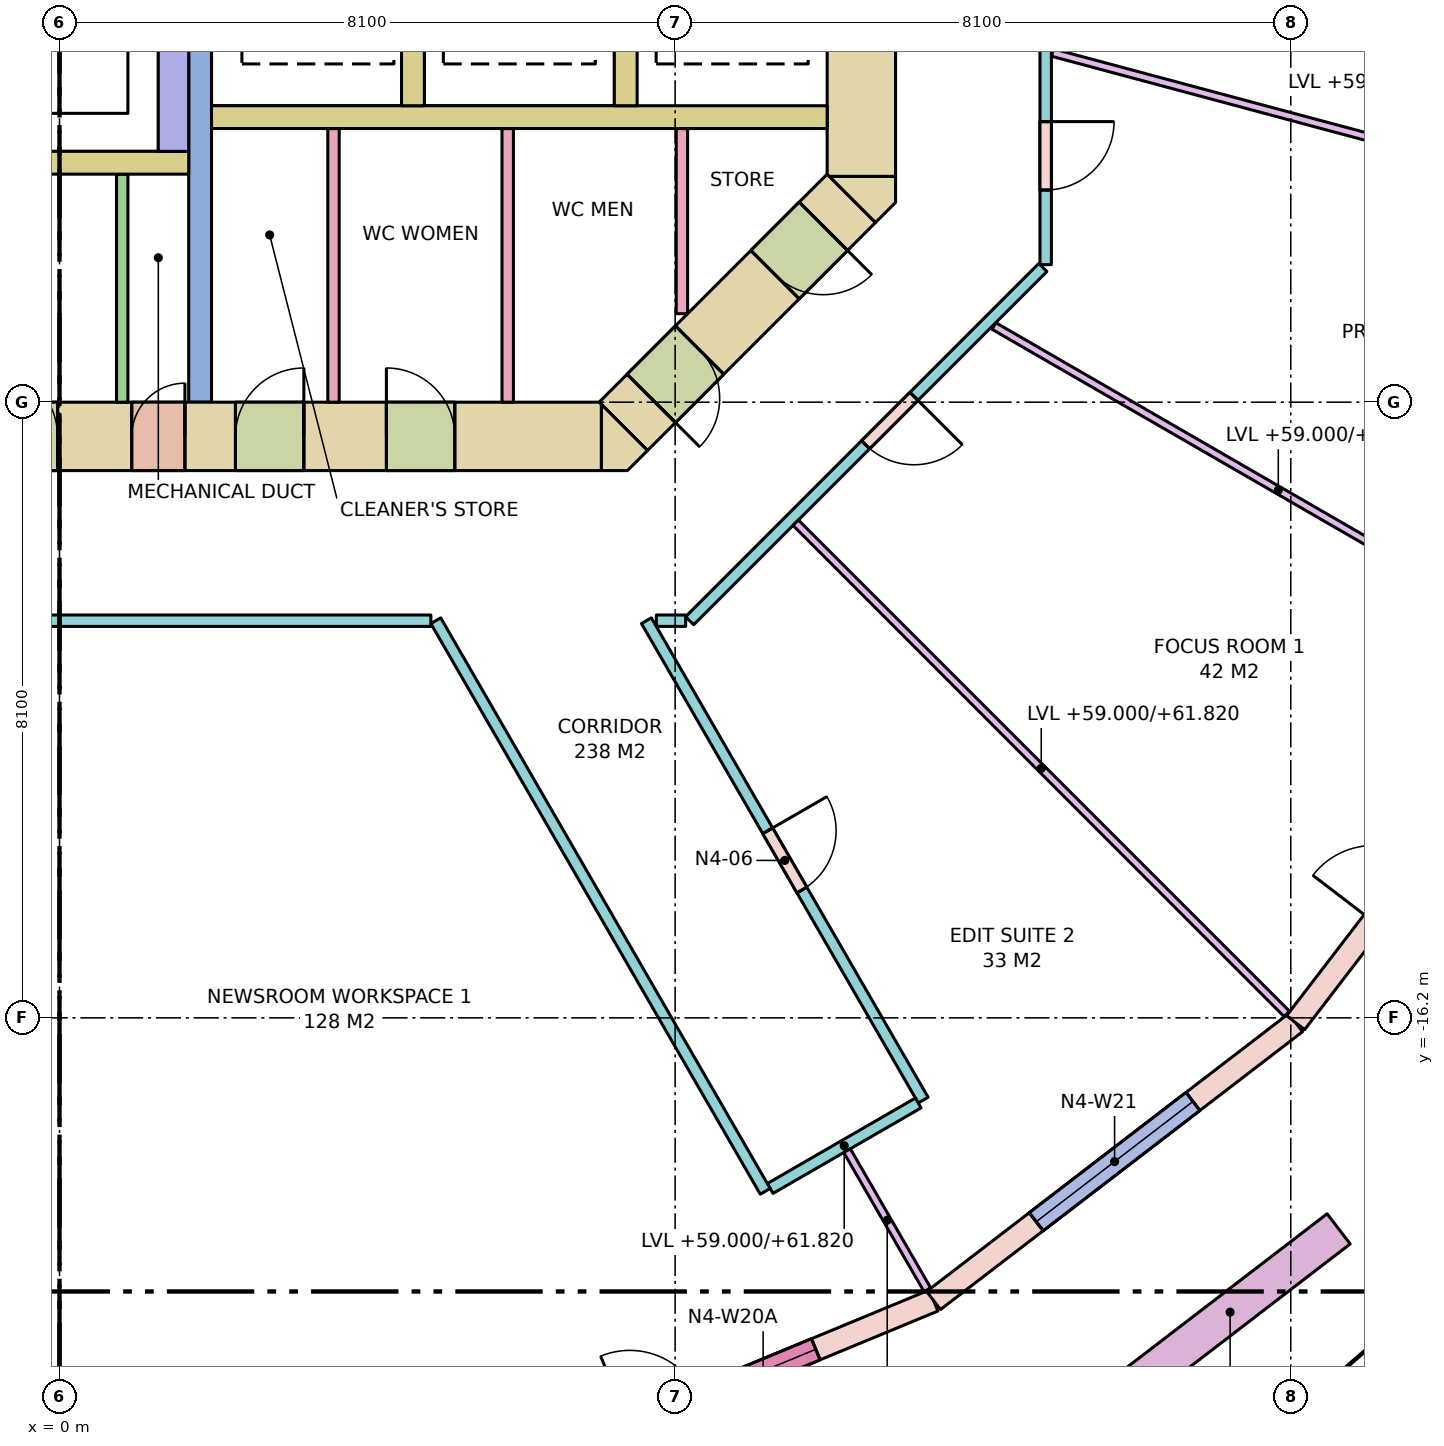
"""IFC4 building model, lengths in metres.
Left out: names, types, materials, properties, quantities, classifications, styles, units other than length and angle.
Written with IfcOpenShell. Run it as: python <this file> out.ifc"""

import sys

from ifc_helpers import new_model, si_unit, direction, frame, frame_2d, origin, place, context, subcontext, project, spatial, polyline, rectangle, outline, extrude, element, fill, save


model = new_model("IFC4")
c1 = context("Model", 3, precision=1e-05, world=origin(), true_north=direction((0.0, 1.0)))
c2 = subcontext(c1, "Body", "Model", "MODEL_VIEW")
j1 = project(units=[si_unit("LENGTHUNIT", "METRE"), si_unit("PLANEANGLEUNIT", "RADIAN")], contexts=[c1])
p1 = place(None, origin())
s1 = spatial("IfcSite", under=j1, at=p1, CompositionType="ELEMENT")
p2 = place(p1, origin())
s2 = spatial("IfcBuilding", under=s1, at=p2, CompositionType="ELEMENT")
p3 = place(p2, frame((0.0, 0.0, 59.0)))
s3 = spatial("IfcBuildingStorey", under=s2, at=p3, CompositionType="ELEMENT", Elevation=59.0)
p4 = place(p3, frame((-7.13, -8.55, -0.28), z_axis=(0.0, 0.0, 1.0), x_axis=(1.0, 0.0, 0.0)))
e1 = element("IfcWall", 1, at=p4, inside=s3, PredefinedType="SHEAR", context=c2, shape_type="SweptSolid", body=[
    extrude(rectangle(XDim=14.26, YDim=0.9, at=frame_2d((7.13, 0.0))), origin(), (0.0, 0.0, 1.0), 4.0),
])
p5 = place(p4, frame((8.08, 0.0, 0.28)))
e2 = element("IfcOpeningElement", 2, at=p5, cuts=e1, PredefinedType="OPENING", context=c2, shape_type="SweptSolid", body=[
    extrude(rectangle(XDim=0.7, YDim=2.1, at=frame_2d((0.35, 1.05))), frame((0.0, 0.46, 0.0), z_axis=(0.0, -1.0, 0.0), x_axis=(1.0, 0.0, 0.0)), (0.0, 0.0, 1.0), 0.92),
])
p6 = place(p4, frame((6.205, 0.0, 0.28)))
e3 = element("IfcOpeningElement", 3, at=p6, cuts=e1, PredefinedType="OPENING", context=c2, shape_type="SweptSolid", body=[
    extrude(rectangle(XDim=0.9, YDim=2.1, at=frame_2d((0.45, 1.05))), frame((0.0, 0.46, 0.0), z_axis=(0.0, -1.0, 0.0), x_axis=(1.0, 0.0, 0.0)), (0.0, 0.0, 1.0), 0.92),
])
p7 = place(p4, frame((9.445, 0.0, 0.28)))
e4 = element("IfcOpeningElement", 4, at=p7, cuts=e1, PredefinedType="OPENING", context=c2, shape_type="SweptSolid", body=[
    extrude(rectangle(XDim=0.9, YDim=2.1, at=frame_2d((0.45, 1.05))), frame((0.0, 0.46, 0.0), z_axis=(0.0, -1.0, 0.0), x_axis=(1.0, 0.0, 0.0)), (0.0, 0.0, 1.0), 0.92),
])
p8 = place(p4, frame((11.431, 0.0, 0.28)))
e5 = element("IfcOpeningElement", 5, at=p8, cuts=e1, PredefinedType="OPENING", context=c2, shape_type="SweptSolid", body=[
    extrude(rectangle(XDim=0.9, YDim=2.1, at=frame_2d((0.45, 1.05))), frame((0.0, 0.46, 0.0), z_axis=(0.0, -1.0, 0.0), x_axis=(1.0, 0.0, 0.0)), (0.0, 0.0, 1.0), 0.92),
])
p9 = place(p3, frame((10.55, -5.13, -0.28), z_axis=(0.0, 0.0, 1.0), x_axis=(0.0, 1.0, 0.0)))
e6 = element("IfcWall", 6, at=p9, inside=s3, PredefinedType="SHEAR", context=c2, shape_type="SweptSolid", body=[
    extrude(rectangle(XDim=10.26, YDim=0.9, at=frame_2d((5.13, 0.0))), origin(), (0.0, 0.0, 1.0), 4.0),
])
p10 = place(p9, frame((4.13, 0.0, 0.28)))
e7 = element("IfcOpeningElement", 7, at=p10, cuts=e6, PredefinedType="OPENING", context=c2, shape_type="SweptSolid", body=[
    extrude(rectangle(XDim=2.0, YDim=2.1, at=frame_2d((1.0, 1.05))), frame((0.0, 0.46, 0.0), z_axis=(0.0, -1.0, 0.0), x_axis=(1.0, 0.0, 0.0)), (0.0, 0.0, 1.0), 0.92),
])
p11 = place(p3, frame((10.418, -5.418, -0.28), z_axis=(0.0, 0.0, 1.0), x_axis=(-0.707106781187, -0.707106781187, 0.0)))
e8 = element("IfcWall", 8, at=p11, inside=s3, PredefinedType="SHEAR", context=c2, shape_type="SweptSolid", body=[
    extrude(rectangle(XDim=4.243, YDim=0.9, at=frame_2d((2.121, 0.0))), origin(), (0.0, 0.0, 1.0), 4.0),
])
p12 = place(p11, frame((2.823, 0.0, 0.28)))
e9 = element("IfcOpeningElement", 9, at=p12, cuts=e8, PredefinedType="OPENING", context=c2, shape_type="SweptSolid", body=[
    extrude(rectangle(XDim=0.9, YDim=2.1, at=frame_2d((0.45, 1.05))), frame((0.0, 0.46, 0.0), z_axis=(0.0, -1.0, 0.0), x_axis=(1.0, 0.0, 0.0)), (0.0, 0.0, 1.0), 0.92),
])
p13 = place(p11, frame((0.52, 0.0, 0.28)))
e10 = element("IfcOpeningElement", 10, at=p13, cuts=e8, PredefinedType="OPENING", context=c2, shape_type="SweptSolid", body=[
    extrude(rectangle(XDim=0.9, YDim=2.1, at=frame_2d((0.45, 1.05))), frame((0.0, 0.46, 0.0), z_axis=(0.0, -1.0, 0.0), x_axis=(1.0, 0.0, 0.0)), (0.0, 0.0, 1.0), 0.92),
])
p14 = place(p3, frame((0.0, 0.0, -0.28)))
e11 = element("IfcWall", 11, at=p14, inside=s3, PredefinedType="SHEAR", context=c2, shape_type="SweptSolid", body=[
    extrude(outline(polyline([(7.473, -9.0), (7.13, -9.0), (7.13, -8.13), (7.736, -8.736), (7.473, -9.0)])), origin(), (0.0, 0.0, 1.0), 4.0),
])
p15 = place(p3, frame((0.0, 0.0, -0.28)))
e12 = element("IfcWall", 12, at=p15, inside=s3, PredefinedType="SHEAR", context=c2, shape_type="SweptSolid", body=[
    extrude(outline(polyline([(11.0, -5.473), (10.736, -5.736), (10.13, -5.13), (11.0, -5.13), (11.0, -5.473)])), origin(), (0.0, 0.0, 1.0), 4.0),
])
p16 = place(p3, frame((2.0, -4.35, 0.0), z_axis=(0.0, 0.0, 1.0), x_axis=(1.0, 0.0, 0.0)))
e13 = element("IfcWall", 13, at=p16, inside=s3, PredefinedType="SOLIDWALL", context=c2, shape_type="SweptSolid", body=[
    extrude(rectangle(XDim=8.1, YDim=0.3, at=frame_2d((4.05, 0.0))), origin(), (0.0, 0.0, 1.0), 3.72),
])
for number, where, z_axis, x_axis in (
    (14, (4.65, -4.2, 0.0), (0.0, 0.0, 1.0), (0.0, 1.0, 0.0)),
    (15, (7.45, -4.2, 0.0), (0.0, 0.0, 1.0), (0.0, 1.0, 0.0)),
):
    element("IfcWall", number, at=place(p3, frame(where, z_axis=z_axis, x_axis=x_axis)), inside=s3, PredefinedType="SOLIDWALL", context=c2, shape_type="SweptSolid", body=[
        extrude(rectangle(XDim=2.4, YDim=0.3, at=frame_2d((1.2, 0.0))), origin(), (0.0, 0.0, 1.0), 3.72),
    ])
p17 = place(p3, frame((1.85, -8.1, 0.0), z_axis=(0.0, 0.0, 1.0), x_axis=(0.0, 1.0, 0.0)))
e16 = element("IfcWall", 16, at=p17, inside=s3, PredefinedType="SHEAR", context=c2, shape_type="SweptSolid", body=[
    extrude(rectangle(XDim=6.6, YDim=0.3, at=frame_2d((3.3, 0.0))), origin(), (0.0, 0.0, 1.0), 3.72),
])
p18 = place(p3, frame((1.5, -4.8, 0.0), z_axis=(0.0, 0.0, 1.0), x_axis=(0.0, 1.0, 0.0)))
e17 = element("IfcWall", 17, at=p18, inside=s3, PredefinedType="SOLIDWALL", context=c2, shape_type="SweptSolid", body=[
    extrude(rectangle(XDim=3.0, YDim=0.4, at=frame_2d((1.5, 0.0))), origin(), (0.0, 0.0, 1.0), 3.72),
])
p19 = place(p3, frame((-1.7, -4.95, 0.0), z_axis=(0.0, 0.0, 1.0), x_axis=(1.0, 0.0, 0.0)))
e18 = element("IfcWall", 18, at=p19, inside=s3, PredefinedType="SOLIDWALL", context=c2, shape_type="SweptSolid", body=[
    extrude(rectangle(XDim=3.4, YDim=0.3, at=frame_2d((1.7, 0.0))), origin(), (0.0, 0.0, 1.0), 3.72),
])
p20 = place(p3, frame((5.953, -22.216, 0.0), z_axis=(0.0, 0.0, 1.0), x_axis=(0.923884511653, 0.382671411433, 0.0)))
e19 = element("IfcWall", 19, at=p20, inside=s3, PredefinedType="STANDARD", context=c2, shape_type="SweptSolid", body=[
    extrude(rectangle(XDim=6.004, YDim=0.3, at=frame_2d((3.002, 0.0))), origin(), (0.0, 0.0, 1.0), 3.72),
])
p21 = place(p20, frame((1.677, 0.0, 0.0)))
e20 = element("IfcOpeningElement", 20, at=p21, cuts=e19, PredefinedType="OPENING", context=c2, shape_type="SweptSolid", body=[
    extrude(rectangle(XDim=1.0, YDim=2.4, at=frame_2d((0.5, 1.2))), frame((0.0, 0.16, 0.0), z_axis=(0.0, -1.0, 0.0), x_axis=(1.0, 0.0, 0.0)), (0.0, 0.0, 1.0), 0.32),
])
p22 = place(p20, frame((2.827, 0.0, 0.8)))
e21 = element("IfcOpeningElement", 21, at=p22, cuts=e19, PredefinedType="OPENING", context=c2, shape_type="SweptSolid", body=[
    extrude(rectangle(XDim=1.5, YDim=2.7, at=frame_2d((0.75, 1.35))), frame((0.0, 0.16, 0.0), z_axis=(0.0, -1.0, 0.0), x_axis=(1.0, 0.0, 0.0)), (0.0, 0.0, 1.0), 0.32),
])
p23 = place(p3, frame((11.5, -19.919, 0.0), z_axis=(0.0, 0.0, 1.0), x_axis=(0.793339924758, 0.608778912074, 0.0)))
e22 = element("IfcWall", 22, at=p23, inside=s3, PredefinedType="STANDARD", context=c2, shape_type="SweptSolid", body=[
    extrude(rectangle(XDim=6.004, YDim=0.3, at=frame_2d((3.002, 0.0))), origin(), (0.0, 0.0, 1.0), 3.72),
])
p24 = place(p23, frame((1.702, 0.0, 0.8)))
e23 = element("IfcOpeningElement", 23, at=p24, cuts=e22, PredefinedType="OPENING", context=c2, shape_type="SweptSolid", body=[
    extrude(rectangle(XDim=2.6, YDim=2.7, at=frame_2d((1.3, 1.35))), frame((0.0, 0.16, 0.0), z_axis=(0.0, -1.0, 0.0), x_axis=(1.0, 0.0, 0.0)), (0.0, 0.0, 1.0), 0.32),
])
p25 = place(p3, frame((16.263, -16.263, 0.0), z_axis=(0.0, 0.0, 1.0), x_axis=(0.608778912074, 0.793339924758, 0.0)))
e24 = element("IfcWall", 24, at=p25, inside=s3, PredefinedType="STANDARD", context=c2, shape_type="SweptSolid", body=[
    extrude(rectangle(XDim=6.004, YDim=0.3, at=frame_2d((3.002, 0.0))), origin(), (0.0, 0.0, 1.0), 3.72),
])
p26 = place(p25, frame((1.677, 0.0, 0.0)))
e25 = element("IfcOpeningElement", 25, at=p26, cuts=e24, PredefinedType="OPENING", context=c2, shape_type="SweptSolid", body=[
    extrude(rectangle(XDim=1.0, YDim=2.4, at=frame_2d((0.5, 1.2))), frame((0.0, 0.16, 0.0), z_axis=(0.0, -1.0, 0.0), x_axis=(1.0, 0.0, 0.0)), (0.0, 0.0, 1.0), 0.32),
])
p27 = place(p25, frame((2.827, 0.0, 0.8)))
e26 = element("IfcOpeningElement", 26, at=p27, cuts=e24, PredefinedType="OPENING", context=c2, shape_type="SweptSolid", body=[
    extrude(rectangle(XDim=1.5, YDim=2.7, at=frame_2d((0.75, 1.35))), frame((0.0, 0.16, 0.0), z_axis=(0.0, -1.0, 0.0), x_axis=(1.0, 0.0, 0.0)), (0.0, 0.0, 1.0), 0.32),
])
p28 = place(p3, frame((13.974, -21.167, 0.0), z_axis=(0.0, 0.0, 1.0), x_axis=(0.793359599829, 0.608753271334, 0.0)))
e27 = element("IfcWall", 27, at=p28, inside=s3, PredefinedType="PARAPET", context=c2, shape_type="SweptSolid", body=[
    extrude(rectangle(XDim=3.6, YDim=0.5, at=frame_2d((1.8, 0.0))), origin(), (0.0, 0.0, 1.0), 0.9),
])
p29 = place(p3, frame((0.825, -8.1, 0.0), z_axis=(0.0, 0.0, 1.0), x_axis=(0.0, 1.0, 0.0)))
e28 = element("IfcWall", 28, at=p29, inside=s3, PredefinedType="PARTITIONING", context=c2, shape_type="SweptSolid", body=[
    extrude(rectangle(XDim=3.0, YDim=0.15, at=frame_2d((1.5, 0.0))), origin(), (0.0, 0.0, 1.0), 3.72),
])
for number, where, z_axis, x_axis in (
    (29, (3.605, -8.1, 0.0), (0.0, 0.0, 1.0), (0.0, 1.0, 0.0)),
    (30, (5.897, -8.1, 0.0), (0.0, 0.0, 1.0), (0.0, 1.0, 0.0)),
):
    element("IfcWall", number, at=place(p3, frame(where, z_axis=z_axis, x_axis=x_axis)), inside=s3, PredefinedType="PARTITIONING", context=c2, shape_type="SweptSolid", body=[
        extrude(rectangle(XDim=3.6, YDim=0.15, at=frame_2d((1.8, 0.0))), origin(), (0.0, 0.0, 1.0), 3.72),
    ])
p30 = place(p3, frame((8.189, -6.936, 0.0), z_axis=(0.0, 0.0, 1.0), x_axis=(0.0, 1.0, 0.0)))
e31 = element("IfcWall", 31, at=p30, inside=s3, PredefinedType="PARTITIONING", context=c2, shape_type="SweptSolid", body=[
    extrude(rectangle(XDim=2.436, YDim=0.15, at=frame_2d((1.218, 0.0))), origin(), (0.0, 0.0, 1.0), 3.72),
])
p31 = place(p3, frame((12.975, 2.234, 0.0), z_axis=(0.0, 0.0, 1.0), x_axis=(0.0, -1.0, 0.0)))
e32 = element("IfcWall", 32, at=p31, inside=s3, PredefinedType="PARTITIONING", context=c2, shape_type="SweptSolid", body=[
    extrude(rectangle(XDim=8.525, YDim=0.15, at=frame_2d((4.263, 0.0))), origin(), (0.0, 0.0, 1.0), 2.82),
])
p32 = place(p31, frame((6.643, 0.0, 0.0)))
e33 = element("IfcOpeningElement", 33, at=p32, cuts=e32, PredefinedType="OPENING", context=c2, shape_type="SweptSolid", body=[
    extrude(rectangle(XDim=0.9, YDim=2.1, at=frame_2d((0.45, 1.05))), frame((0.0, 0.085, 0.0), z_axis=(0.0, -1.0, 0.0), x_axis=(1.0, 0.0, 0.0)), (0.0, 0.0, 1.0), 0.17),
])
p33 = place(p3, frame((12.938, -6.328, 0.0), z_axis=(0.0, 0.0, 1.0), x_axis=(-0.707088206597, -0.707125355289, 0.0)))
e34 = element("IfcWall", 34, at=p33, inside=s3, PredefinedType="PARTITIONING", context=c2, shape_type="SweptSolid", body=[
    extrude(rectangle(XDim=6.572, YDim=0.15, at=frame_2d((3.286, 0.0))), origin(), (0.0, 0.0, 1.0), 2.82),
])
p34 = place(p33, frame((2.398, 0.0, 0.0)))
e35 = element("IfcOpeningElement", 35, at=p34, cuts=e34, PredefinedType="OPENING", context=c2, shape_type="SweptSolid", body=[
    extrude(rectangle(XDim=0.9, YDim=2.1, at=frame_2d((0.45, 1.05))), frame((0.0, 0.085, 0.0), z_axis=(0.0, -1.0, 0.0), x_axis=(1.0, 0.0, 0.0)), (0.0, 0.0, 1.0), 0.17),
])
p35 = place(p3, frame((8.238, -10.975, 0.0), z_axis=(0.0, 0.0, 1.0), x_axis=(-1.0, 0.0, 0.0)))
e36 = element("IfcWall", 36, at=p35, inside=s3, PredefinedType="PARTITIONING", context=c2, shape_type="SweptSolid", body=[
    extrude(rectangle(XDim=0.386, YDim=0.15, at=frame_2d((0.193, 0.0))), origin(), (0.0, 0.0, 1.0), 3.72),
])
p36 = place(p3, frame((7.722, -10.975, 0.0), z_axis=(0.0, 0.0, 1.0), x_axis=(0.499993290699, -0.866029277366, 0.0)))
e37 = element("IfcWall", 37, at=p36, inside=s3, PredefinedType="PARTITIONING", context=c2, shape_type="SweptSolid", body=[
    extrude(rectangle(XDim=7.283, YDim=0.15, at=frame_2d((3.641, 0.0))), origin(), (0.0, 0.0, 1.0), 3.72),
])
p37 = place(p36, frame((3.191, 0.0, 0.0)))
e38 = element("IfcOpeningElement", 38, at=p37, cuts=e37, PredefinedType="OPENING", context=c2, shape_type="SweptSolid", body=[
    extrude(rectangle(XDim=0.9, YDim=2.1, at=frame_2d((0.45, 1.05))), frame((0.0, 0.085, 0.0), z_axis=(0.0, -1.0, 0.0), x_axis=(1.0, 0.0, 0.0)), (0.0, 0.0, 1.0), 0.17),
])
p38 = place(p3, frame((11.299, -17.32, 0.0), z_axis=(0.0, 0.0, 1.0), x_axis=(-0.866017533419, -0.500013631625, 0.0)))
e39 = element("IfcWall", 39, at=p38, inside=s3, PredefinedType="PARTITIONING", context=c2, shape_type="SweptSolid", body=[
    extrude(rectangle(XDim=2.25, YDim=0.15, at=frame_2d((1.125, 0.0))), origin(), (0.0, 0.0, 1.0), 2.82),
])
p39 = place(p3, frame((9.285, -18.482, 0.0), z_axis=(0.0, 0.0, 1.0), x_axis=(-0.500010122307, 0.866019559589, 0.0)))
e40 = element("IfcWall", 40, at=p39, inside=s3, PredefinedType="PARTITIONING", context=c2, shape_type="SweptSolid", body=[
    extrude(rectangle(XDim=8.669, YDim=0.15, at=frame_2d((4.334, 0.0))), origin(), (0.0, 0.0, 1.0), 3.72),
])
p40 = place(p3, frame((4.886, -10.975, 0.0), z_axis=(0.0, 0.0, 1.0), x_axis=(-1.0, 0.0, 0.0)))
e41 = element("IfcWall", 41, at=p40, inside=s3, PredefinedType="PARTITIONING", context=c2, shape_type="SweptSolid", body=[
    extrude(rectangle(XDim=6.512, YDim=0.15, at=frame_2d((3.256, 0.0))), origin(), (0.0, 0.0, 1.0), 2.82),
])
p41 = place(p3, frame((10.362, -17.947, 0.0), z_axis=(0.0, 0.0, 1.0), x_axis=(0.500065834316, -0.865987390988, 0.0)))
e42 = element("IfcWall", 42, at=p41, inside=s3, PredefinedType="PARTITIONING", context=c2, shape_type="SweptSolid", body=[
    extrude(rectangle(XDim=2.113, YDim=0.1, at=frame_2d((1.057, 0.0))), origin(), (0.0, 0.0, 1.0), 2.82),
])
p42 = place(p3, frame((9.686, -9.686, 0.0), z_axis=(0.0, 0.0, 1.0), x_axis=(0.707106781187, -0.707106781187, 0.0)))
e43 = element("IfcWall", 43, at=p42, inside=s3, PredefinedType="PARTITIONING", context=c2, shape_type="SweptSolid", body=[
    extrude(rectangle(XDim=9.138, YDim=0.1, at=frame_2d((4.569, 0.0))), origin(), (0.0, 0.0, 1.0), 2.82),
])
p43 = place(p3, frame((12.294, -7.098, 0.0), z_axis=(0.0, 0.0, 1.0), x_axis=(0.866010547425, -0.500025731086, 0.0)))
e44 = element("IfcWall", 44, at=p43, inside=s3, PredefinedType="PARTITIONING", context=c2, shape_type="SweptSolid", body=[
    extrude(rectangle(XDim=8.641, YDim=0.1, at=frame_2d((4.32, 0.0))), origin(), (0.0, 0.0, 1.0), 2.82),
])
p44 = place(p3, frame((13.064, -3.5, 0.0), z_axis=(0.0, 0.0, 1.0), x_axis=(0.965922655056, -0.258830880017, 0.0)))
e45 = element("IfcWall", 45, at=p44, inside=s3, PredefinedType="PARTITIONING", context=c2, shape_type="SweptSolid", body=[
    extrude(rectangle(XDim=9.312, YDim=0.1, at=frame_2d((4.656, 0.0))), origin(), (0.0, 0.0, 1.0), 2.82),
])
p45 = place(p22, origin())
e46 = element("IfcWindow", 46, at=p45, inside=s3, PartitioningType="SINGLE_PANEL", PredefinedType="WINDOW", context=c2, shape_type="SweptSolid", body=[
    extrude(rectangle(XDim=1.5, YDim=2.7, at=frame_2d((0.75, 1.35))), frame((0.0, 0.03, 0.0), z_axis=(0.0, -1.0, 0.0), x_axis=(1.0, 0.0, 0.0)), (0.0, 0.0, 1.0), 0.06),
])
fill(e21, e46)
p46 = place(p24, origin())
e47 = element("IfcWindow", 47, at=p46, inside=s3, PartitioningType="SINGLE_PANEL", PredefinedType="WINDOW", context=c2, shape_type="SweptSolid", body=[
    extrude(rectangle(XDim=2.6, YDim=2.7, at=frame_2d((1.3, 1.35))), frame((0.0, 0.03, 0.0), z_axis=(0.0, -1.0, 0.0), x_axis=(1.0, 0.0, 0.0)), (0.0, 0.0, 1.0), 0.06),
])
fill(e23, e47)
p47 = place(p5, origin())
e48 = element("IfcDoor", 48, at=p47, inside=s3, OperationType="SINGLE_SWING_RIGHT", PredefinedType="DOOR", context=c2, shape_type="SweptSolid", body=[
    extrude(rectangle(XDim=0.7, YDim=2.1, at=frame_2d((0.35, 1.05))), frame((0.0, 0.025, 0.0), z_axis=(0.0, -1.0, 0.0), x_axis=(1.0, 0.0, 0.0)), (0.0, 0.0, 1.0), 0.05),
])
fill(e2, e48)
p48 = place(p6, origin())
e49 = element("IfcDoor", 49, at=p48, inside=s3, OperationType="SINGLE_SWING_LEFT", PredefinedType="DOOR", context=c2, shape_type="SweptSolid", body=[
    extrude(rectangle(XDim=0.9, YDim=2.1, at=frame_2d((0.45, 1.05))), frame((0.0, 0.025, 0.0), z_axis=(0.0, -1.0, 0.0), x_axis=(1.0, 0.0, 0.0)), (0.0, 0.0, 1.0), 0.05),
])
fill(e3, e49)
p49 = place(p7, origin())
e50 = element("IfcDoor", 50, at=p49, inside=s3, OperationType="SINGLE_SWING_RIGHT", PredefinedType="DOOR", context=c2, shape_type="SweptSolid", body=[
    extrude(rectangle(XDim=0.9, YDim=2.1, at=frame_2d((0.45, 1.05))), frame((0.0, 0.025, 0.0), z_axis=(0.0, -1.0, 0.0), x_axis=(1.0, 0.0, 0.0)), (0.0, 0.0, 1.0), 0.05),
])
fill(e4, e50)
p50 = place(p8, origin())
e51 = element("IfcDoor", 51, at=p50, inside=s3, OperationType="SINGLE_SWING_LEFT", PredefinedType="DOOR", context=c2, shape_type="SweptSolid", body=[
    extrude(rectangle(XDim=0.9, YDim=2.1, at=frame_2d((0.45, 1.05))), frame((0.0, 0.025, 0.0), z_axis=(0.0, -1.0, 0.0), x_axis=(1.0, 0.0, 0.0)), (0.0, 0.0, 1.0), 0.05),
])
fill(e5, e51)
p51 = place(p12, origin())
e52 = element("IfcDoor", 52, at=p51, inside=s3, OperationType="SINGLE_SWING_RIGHT", PredefinedType="DOOR", context=c2, shape_type="SweptSolid", body=[
    extrude(rectangle(XDim=0.9, YDim=2.1, at=frame_2d((0.45, 1.05))), frame((0.0, 0.025, 0.0), z_axis=(0.0, -1.0, 0.0), x_axis=(1.0, 0.0, 0.0)), (0.0, 0.0, 1.0), 0.05),
])
fill(e9, e52)
p52 = place(p13, origin())
e53 = element("IfcDoor", 53, at=p52, inside=s3, OperationType="SINGLE_SWING_LEFT", PredefinedType="DOOR", context=c2, shape_type="SweptSolid", body=[
    extrude(rectangle(XDim=0.9, YDim=2.1, at=frame_2d((0.45, 1.05))), frame((0.0, 0.025, 0.0), z_axis=(0.0, -1.0, 0.0), x_axis=(1.0, 0.0, 0.0)), (0.0, 0.0, 1.0), 0.05),
])
fill(e10, e53)
p53 = place(p37, origin())
e54 = element("IfcDoor", 54, at=p53, inside=s3, OperationType="SINGLE_SWING_LEFT", PredefinedType="DOOR", context=c2, shape_type="SweptSolid", body=[
    extrude(rectangle(XDim=0.9, YDim=2.1, at=frame_2d((0.45, 1.05))), frame((0.0, 0.025, 0.0), z_axis=(0.0, -1.0, 0.0), x_axis=(1.0, 0.0, 0.0)), (0.0, 0.0, 1.0), 0.05),
])
fill(e38, e54)
p54 = place(p34, origin())
e55 = element("IfcDoor", 55, at=p54, inside=s3, OperationType="SINGLE_SWING_LEFT", PredefinedType="DOOR", context=c2, shape_type="SweptSolid", body=[
    extrude(rectangle(XDim=0.9, YDim=2.1, at=frame_2d((0.45, 1.05))), frame((0.0, 0.025, 0.0), z_axis=(0.0, -1.0, 0.0), x_axis=(1.0, 0.0, 0.0)), (0.0, 0.0, 1.0), 0.05),
])
fill(e35, e55)
p55 = place(p32, origin())
e56 = element("IfcDoor", 56, at=p55, inside=s3, OperationType="SINGLE_SWING_LEFT", PredefinedType="DOOR", context=c2, shape_type="SweptSolid", body=[
    extrude(rectangle(XDim=0.9, YDim=2.1, at=frame_2d((0.45, 1.05))), frame((0.0, 0.025, 0.0), z_axis=(0.0, -1.0, 0.0), x_axis=(1.0, 0.0, 0.0)), (0.0, 0.0, 1.0), 0.05),
])
fill(e33, e56)
save(model, sys.argv[1])
